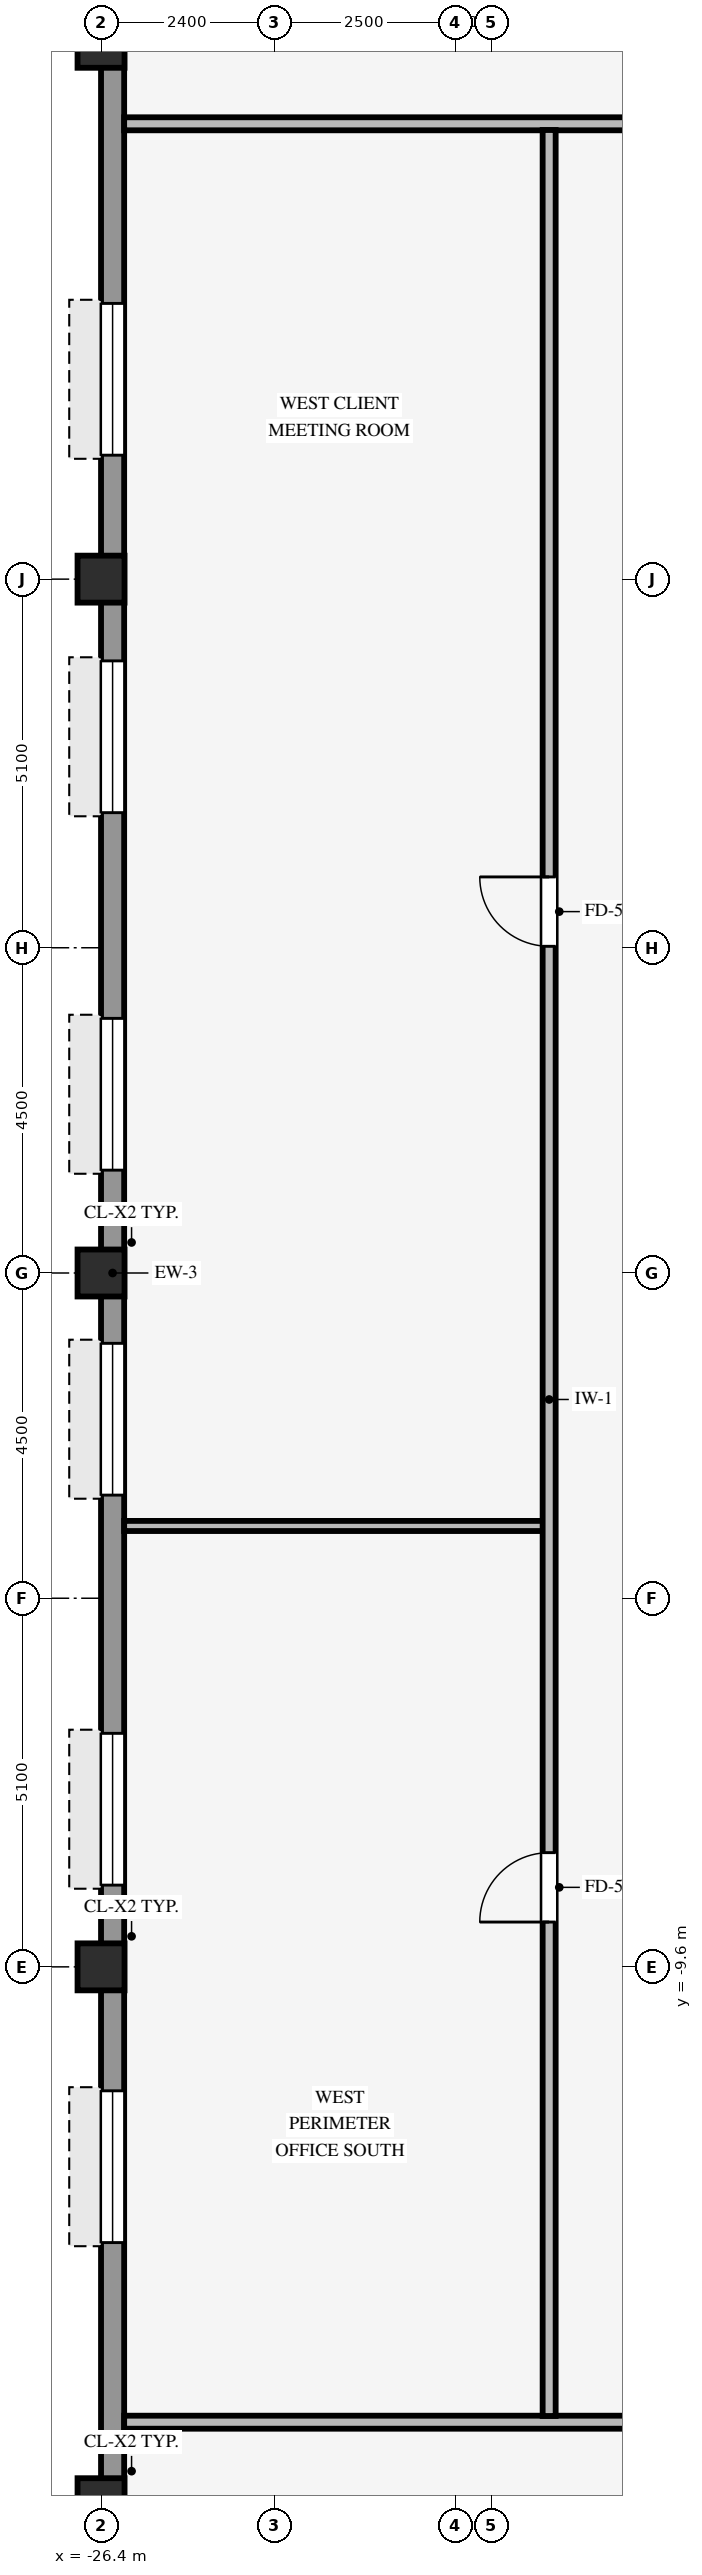
"""IFC4 building model, lengths in metres.
Left out: names, types, materials, properties, quantities, classifications, styles, units other than length and angle.
Written with IfcOpenShell. Run it as: python <this file> out.ifc"""

import sys

from ifc_helpers import new_model, si_unit, direction, frame, frame_2d, origin, origin_2d, place, context, subcontext, project, spatial, rectangle, hollow_rectangle, extrude, source, transform, mapped, element, fill, save


model = new_model("IFC4")
c1 = context("Model", 3, precision=1e-05, world=origin(), true_north=direction((0.0, 1.0)))
c2 = subcontext(c1, "Body", "Model", "MODEL_VIEW")
j1 = project(units=[si_unit("LENGTHUNIT", "METRE"), si_unit("PLANEANGLEUNIT", "RADIAN")], contexts=[c1])
p1 = place(None, origin())
s1 = spatial("IfcSite", under=j1, at=p1, CompositionType="ELEMENT")
p2 = place(p1, origin())
s2 = spatial("IfcBuilding", under=s1, at=p2, CompositionType="ELEMENT")
p3 = place(p2, frame((0.0, 0.0, 127.5)))
s3 = spatial("IfcBuildingStorey", under=s2, at=p3, CompositionType="ELEMENT", Elevation=127.5)
for number, where, z_axis, x_axis in (
    (1, (-26.4, -17.0, 0.0), (0.0, 0.0, 1.0), (1.0, 0.0, 0.0)),
    (2, (-26.4, -9.6, 0.0), (0.0, 0.0, 1.0), (1.0, 0.0, 0.0)),
    (3, (-26.4, 0.0, 0.0), (0.0, 0.0, 1.0), (1.0, 0.0, 0.0)),
    (4, (-26.4, 9.6, 0.0), (0.0, 0.0, 1.0), (1.0, 0.0, 0.0)),
    (5, (-26.4, 17.0, 0.0), (0.0, 0.0, 1.0), (1.0, 0.0, 0.0)),
):
    element("IfcColumn", number, at=place(p3, frame(where, z_axis=z_axis, x_axis=x_axis)), inside=s3, PredefinedType="COLUMN", context=c2, shape_type="SweptSolid", body=[
        extrude(hollow_rectangle(XDim=0.65, YDim=0.65, WallThickness=0.04, InnerFilletRadius=0.04, OuterFilletRadius=0.08, at=origin_2d()), origin(), (0.0, 0.0, 1.0), 3.37),
    ])
p4 = place(p3, frame((-26.24, -20.784, 0.0), z_axis=(0.0, 0.0, 1.0), x_axis=(0.0, 1.0, 0.0)))
e6 = element("IfcWall", 6, at=p4, inside=s3, PredefinedType="STANDARD", context=c2, shape_type="SweptSolid", body=[
    extrude(rectangle(XDim=41.568, YDim=0.32, at=frame_2d((20.784, 0.0))), origin(), (0.0, 0.0, 1.0), 2.705),
])
p5 = place(p4, frame((7.369, 0.0, 0.8)))
e7 = element("IfcOpeningElement", 7, at=p5, cuts=e6, PredefinedType="OPENING", context=c2, shape_type="SweptSolid", body=[
    extrude(rectangle(XDim=2.1, YDim=1.56, at=frame_2d((1.05, 0.78))), frame((0.0, 0.17, 0.0), z_axis=(0.0, -1.0, 0.0), x_axis=(1.0, 0.0, 0.0)), (0.0, 0.0, 1.0), 0.34),
])
p6 = place(p4, frame((12.315, 0.0, 0.8)))
e8 = element("IfcOpeningElement", 8, at=p6, cuts=e6, PredefinedType="OPENING", context=c2, shape_type="SweptSolid", body=[
    extrude(rectangle(XDim=2.1, YDim=1.56, at=frame_2d((1.05, 0.78))), frame((0.0, 0.17, 0.0), z_axis=(0.0, -1.0, 0.0), x_axis=(1.0, 0.0, 0.0)), (0.0, 0.0, 1.0), 0.34),
])
p7 = place(p4, frame((17.711, 0.0, 0.8)))
e9 = element("IfcOpeningElement", 9, at=p7, cuts=e6, PredefinedType="OPENING", context=c2, shape_type="SweptSolid", body=[
    extrude(rectangle(XDim=2.1, YDim=1.56, at=frame_2d((1.05, 0.78))), frame((0.0, 0.17, 0.0), z_axis=(0.0, -1.0, 0.0), x_axis=(1.0, 0.0, 0.0)), (0.0, 0.0, 1.0), 0.34),
])
p8 = place(p4, frame((22.207, 0.0, 0.8)))
e10 = element("IfcOpeningElement", 10, at=p8, cuts=e6, PredefinedType="OPENING", context=c2, shape_type="SweptSolid", body=[
    extrude(rectangle(XDim=2.1, YDim=1.56, at=frame_2d((1.05, 0.78))), frame((0.0, 0.17, 0.0), z_axis=(0.0, -1.0, 0.0), x_axis=(1.0, 0.0, 0.0)), (0.0, 0.0, 1.0), 0.34),
])
p9 = place(p4, frame((27.153, 0.0, 0.8)))
e11 = element("IfcOpeningElement", 11, at=p9, cuts=e6, PredefinedType="OPENING", context=c2, shape_type="SweptSolid", body=[
    extrude(rectangle(XDim=2.1, YDim=1.56, at=frame_2d((1.05, 0.78))), frame((0.0, 0.17, 0.0), z_axis=(0.0, -1.0, 0.0), x_axis=(1.0, 0.0, 0.0)), (0.0, 0.0, 1.0), 0.34),
])
p10 = place(p4, frame((32.099, 0.0, 0.8)))
e12 = element("IfcOpeningElement", 12, at=p10, cuts=e6, PredefinedType="OPENING", context=c2, shape_type="SweptSolid", body=[
    extrude(rectangle(XDim=2.1, YDim=1.56, at=frame_2d((1.05, 0.78))), frame((0.0, 0.17, 0.0), z_axis=(0.0, -1.0, 0.0), x_axis=(1.0, 0.0, 0.0)), (0.0, 0.0, 1.0), 0.34),
])
p11 = place(p3, frame((-26.08, -15.9, 0.0), z_axis=(0.0, 0.0, 1.0), x_axis=(1.0, 0.0, 0.0)))
e13 = element("IfcWall", 13, at=p11, inside=s3, PredefinedType="PARTITIONING", context=c2, shape_type="SweptSolid", body=[
    extrude(rectangle(XDim=52.16, YDim=0.18, at=frame_2d((26.08, 0.0))), origin(), (0.0, 0.0, 1.0), 3.36),
])
p12 = place(p11, frame((14.28, 0.0, 0.0)))
e14 = element("IfcOpeningElement", 14, at=p12, cuts=e13, PredefinedType="OPENING", context=c2, shape_type="SweptSolid", body=[
    extrude(rectangle(XDim=0.96, YDim=2.1, at=frame_2d((0.48, 1.05))), frame((0.0, 0.1, 0.0), z_axis=(0.0, -1.0, 0.0), x_axis=(1.0, 0.0, 0.0)), (0.0, 0.0, 1.0), 0.2),
])
p13 = place(p11, frame((40.5, 0.0, 0.0)))
e15 = element("IfcOpeningElement", 15, at=p13, cuts=e13, PredefinedType="OPENING", context=c2, shape_type="SweptSolid", body=[
    extrude(rectangle(XDim=0.96, YDim=2.1, at=frame_2d((0.48, 1.05))), frame((0.0, 0.1, 0.0), z_axis=(0.0, -1.0, 0.0), x_axis=(1.0, 0.0, 0.0)), (0.0, 0.0, 1.0), 0.2),
])
p14 = place(p3, frame((-26.08, -3.5, 0.0), z_axis=(0.0, 0.0, 1.0), x_axis=(1.0, 0.0, 0.0)))
e16 = element("IfcWall", 16, at=p14, inside=s3, PredefinedType="PARTITIONING", context=c2, shape_type="SweptSolid", body=[
    extrude(rectangle(XDim=5.794, YDim=0.14, at=frame_2d((2.897, 0.0))), origin(), (0.0, 0.0, 1.0), 3.36),
])
p15 = place(p3, frame((-26.08, 15.9, 0.0), z_axis=(0.0, 0.0, 1.0), x_axis=(1.0, 0.0, 0.0)))
e17 = element("IfcWall", 17, at=p15, inside=s3, PredefinedType="PARTITIONING", context=c2, shape_type="SweptSolid", body=[
    extrude(rectangle(XDim=52.16, YDim=0.18, at=frame_2d((26.08, 0.0))), origin(), (0.0, 0.0, 1.0), 3.36),
])
p16 = place(p15, frame((18.3, 0.0, 0.0)))
e18 = element("IfcOpeningElement", 18, at=p16, cuts=e17, PredefinedType="OPENING", context=c2, shape_type="SweptSolid", body=[
    extrude(rectangle(XDim=0.96, YDim=2.1, at=frame_2d((0.48, 1.05))), frame((0.0, 0.1, 0.0), z_axis=(0.0, -1.0, 0.0), x_axis=(1.0, 0.0, 0.0)), (0.0, 0.0, 1.0), 0.2),
])
p17 = place(p15, frame((40.5, 0.0, 0.0)))
e19 = element("IfcOpeningElement", 19, at=p17, cuts=e17, PredefinedType="OPENING", context=c2, shape_type="SweptSolid", body=[
    extrude(rectangle(XDim=0.96, YDim=2.1, at=frame_2d((0.48, 1.05))), frame((0.0, 0.1, 0.0), z_axis=(0.0, -1.0, 0.0), x_axis=(1.0, 0.0, 0.0)), (0.0, 0.0, 1.0), 0.2),
])
p18 = place(p3, frame((-20.2, -15.814, 0.0), z_axis=(0.0, 0.0, 1.0), x_axis=(0.0, 1.0, 0.0)))
e20 = element("IfcWall", 20, at=p18, inside=s3, PredefinedType="PARTITIONING", context=c2, shape_type="SweptSolid", body=[
    extrude(rectangle(XDim=31.628, YDim=0.18, at=frame_2d((15.814, 0.0))), origin(), (0.0, 0.0, 1.0), 3.36),
])
p19 = place(p18, frame((20.334, 0.0, 0.0)))
e21 = element("IfcOpeningElement", 21, at=p19, cuts=e20, PredefinedType="OPENING", context=c2, shape_type="SweptSolid", body=[
    extrude(rectangle(XDim=0.96, YDim=2.1, at=frame_2d((0.48, 1.05))), frame((0.0, 0.1, 0.0), z_axis=(0.0, -1.0, 0.0), x_axis=(1.0, 0.0, 0.0)), (0.0, 0.0, 1.0), 0.2),
])
p20 = place(p18, frame((6.834, 0.0, 0.0)))
e22 = element("IfcOpeningElement", 22, at=p20, cuts=e20, PredefinedType="OPENING", context=c2, shape_type="SweptSolid", body=[
    extrude(rectangle(XDim=0.96, YDim=2.1, at=frame_2d((0.48, 1.05))), frame((0.0, 0.1, 0.0), z_axis=(0.0, -1.0, 0.0), x_axis=(1.0, 0.0, 0.0)), (0.0, 0.0, 1.0), 0.2),
])
m1 = source(origin(), c2, "Body", "SweptSolid", [
    extrude(rectangle(XDim=2.1, YDim=1.56, at=frame_2d((1.05, 0.78))), frame((0.0, 0.03, 0.0), z_axis=(0.0, -1.0, 0.0), x_axis=(1.0, 0.0, 0.0)), (0.0, 0.0, 1.0), 0.06),
])
p21 = place(p5, origin())
e23 = element("IfcWindow", 23, at=p21, inside=s3, PartitioningType="SINGLE_PANEL", PredefinedType="WINDOW", context=c2, shape_type="MappedRepresentation", body=[
    mapped(m1, transform((0.0, 0.0, 0.0), scale=1.0)),
])
fill(e7, e23)
p22 = place(p6, origin())
e24 = element("IfcWindow", 24, at=p22, inside=s3, PartitioningType="SINGLE_PANEL", PredefinedType="WINDOW", context=c2, shape_type="MappedRepresentation", body=[
    mapped(m1, transform((0.0, 0.0, 0.0), scale=1.0)),
])
fill(e8, e24)
p23 = place(p7, origin())
e25 = element("IfcWindow", 25, at=p23, inside=s3, PartitioningType="SINGLE_PANEL", PredefinedType="WINDOW", context=c2, shape_type="MappedRepresentation", body=[
    mapped(m1, transform((0.0, 0.0, 0.0), scale=1.0)),
])
fill(e9, e25)
p24 = place(p8, origin())
e26 = element("IfcWindow", 26, at=p24, inside=s3, PartitioningType="SINGLE_PANEL", PredefinedType="WINDOW", context=c2, shape_type="MappedRepresentation", body=[
    mapped(m1, transform((0.0, 0.0, 0.0), scale=1.0)),
])
fill(e10, e26)
p25 = place(p9, origin())
e27 = element("IfcWindow", 27, at=p25, inside=s3, PartitioningType="SINGLE_PANEL", PredefinedType="WINDOW", context=c2, shape_type="MappedRepresentation", body=[
    mapped(m1, transform((0.0, 0.0, 0.0), scale=1.0)),
])
fill(e11, e27)
p26 = place(p10, origin())
e28 = element("IfcWindow", 28, at=p26, inside=s3, PartitioningType="SINGLE_PANEL", PredefinedType="WINDOW", context=c2, shape_type="MappedRepresentation", body=[
    mapped(m1, transform((0.0, 0.0, 0.0), scale=1.0)),
])
fill(e12, e28)
m2 = source(origin(), c2, "Body", "SweptSolid", [
    extrude(rectangle(XDim=0.96, YDim=2.1, at=frame_2d((0.48, 1.05))), frame((0.0, 0.025, 0.0), z_axis=(0.0, -1.0, 0.0), x_axis=(1.0, 0.0, 0.0)), (0.0, 0.0, 1.0), 0.05),
])
p27 = place(p19, origin())
e29 = element("IfcDoor", 29, at=p27, inside=s3, OperationType="SINGLE_SWING_RIGHT", PredefinedType="DOOR", context=c2, shape_type="MappedRepresentation", body=[
    mapped(m2, transform((0.0, 0.0, 0.0), scale=1.0)),
])
fill(e21, e29)
p28 = place(p20, origin())
e30 = element("IfcDoor", 30, at=p28, inside=s3, OperationType="SINGLE_SWING_LEFT", PredefinedType="DOOR", context=c2, shape_type="MappedRepresentation", body=[
    mapped(m2, transform((0.0, 0.0, 0.0), scale=1.0)),
])
fill(e22, e30)
save(model, sys.argv[1])
